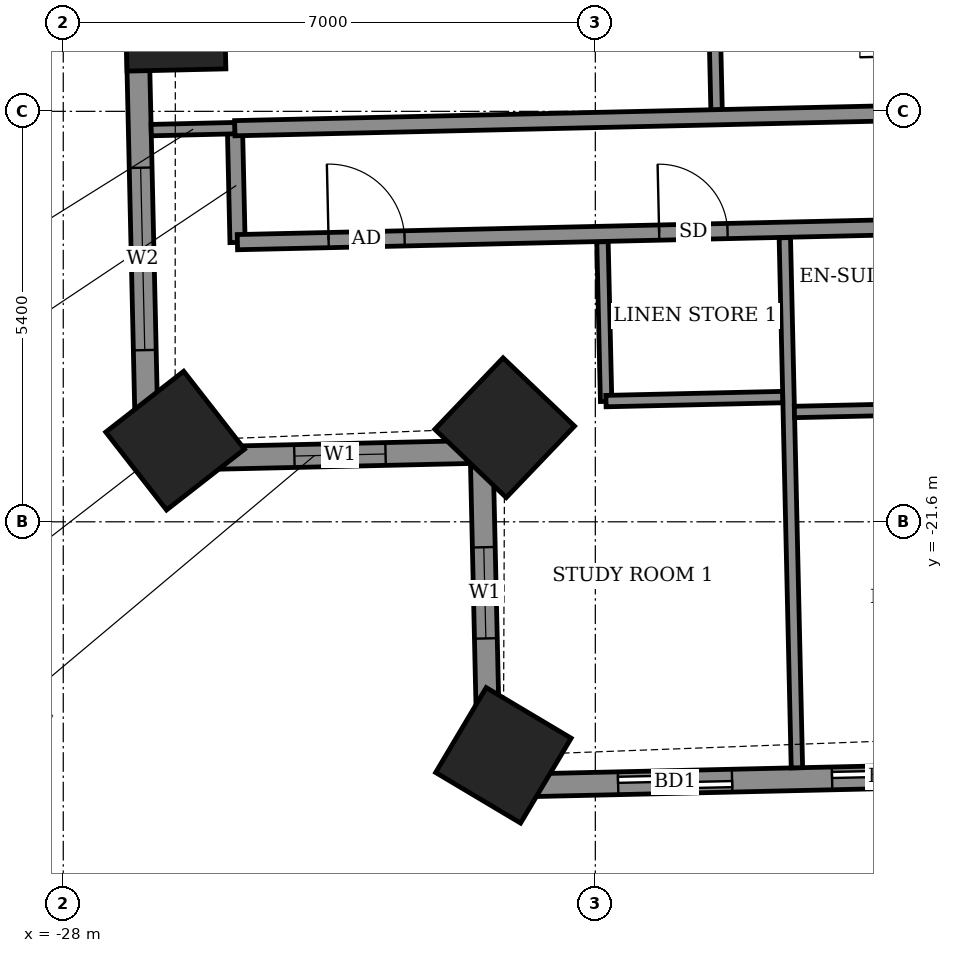
"""IFC4 building model, lengths in metres.
Left out: names, types, materials, properties, quantities, classifications, styles, units other than length and angle.
Written with IfcOpenShell. Run it as: python <this file> out.ifc"""

import sys

from ifc_helpers import new_model, si_unit, direction, frame, frame_2d, origin, origin_2d, place, context, subcontext, project, spatial, rectangle, extrude, element, fill, save


model = new_model("IFC4")
c1 = context("Model", 3, precision=1e-05, world=origin(), true_north=direction((0.0, 1.0)))
c2 = subcontext(c1, "Body", "Model", "MODEL_VIEW")
j1 = project(units=[si_unit("LENGTHUNIT", "METRE"), si_unit("PLANEANGLEUNIT", "RADIAN")], contexts=[c1])
p1 = place(None, origin())
s1 = spatial("IfcSite", under=j1, at=p1, CompositionType="ELEMENT")
p2 = place(p1, origin())
s2 = spatial("IfcBuilding", under=s1, at=p2, CompositionType="ELEMENT")
p3 = place(p2, frame((0.0, 0.0, 130.1)))
s3 = spatial("IfcBuildingStorey", under=s2, at=p3, CompositionType="ELEMENT", Elevation=130.1)
for number, where, z_axis, x_axis in (
    (1, (-26.525, -15.006, -0.55), (0.0, 0.0, 1.0), (0.023, -1.0, 0.0)),
    (2, (-26.529, -20.532, -0.55), (0.0, 0.0, 1.0), (0.615, -0.788, 0.0)),
    (3, (-22.193, -20.362, -0.55), (0.0, 0.0, 1.0), (0.723, -0.691, 0.0)),
    (4, (-22.209, -24.672, -0.55), (0.0, 0.0, 1.0), (0.859, -0.512, 0.0)),
):
    element("IfcColumn", number, at=place(p3, frame(where, z_axis=z_axis, x_axis=x_axis)), inside=s3, PredefinedType="COLUMN", context=c2, shape_type="SweptSolid", body=[
        extrude(rectangle(XDim=1.3, YDim=1.3, at=origin_2d()), origin(), (0.0, 0.0, 1.0), 3.6),
    ])
p4 = place(p3, frame((-27.161, -9.052, 0.0), z_axis=(0.0, 0.0, 1.0), x_axis=(0.022665616813, -0.999743101909, 0.0)))
e5 = element("IfcWall", 5, at=p4, inside=s3, PredefinedType="SOLIDWALL", context=c2, shape_type="SweptSolid", body=[
    extrude(rectangle(XDim=11.73, YDim=0.3, at=frame_2d((5.865, 0.0))), origin(), (0.0, 0.0, 1.0), 3.05),
])
p5 = place(p4, frame((1.029, 0.0, 0.0)))
e6 = element("IfcOpeningElement", 6, at=p5, cuts=e5, PredefinedType="OPENING", context=c2, shape_type="SweptSolid", body=[
    extrude(rectangle(XDim=1.5, YDim=2.4, at=frame_2d((0.75, 1.2))), frame((0.0, 0.16, 0.0), z_axis=(0.0, -1.0, 0.0), x_axis=(1.0, 0.0, 0.0)), (0.0, 0.0, 1.0), 0.32),
])
p6 = place(p4, frame((3.71, 0.0, 0.9)))
e7 = element("IfcOpeningElement", 7, at=p6, cuts=e5, PredefinedType="OPENING", context=c2, shape_type="SweptSolid", body=[
    extrude(rectangle(XDim=1.2, YDim=1.5, at=frame_2d((0.6, 0.75))), frame((0.0, 0.16, 0.0), z_axis=(0.0, -1.0, 0.0), x_axis=(1.0, 0.0, 0.0)), (0.0, 0.0, 1.0), 0.32),
])
p7 = place(p4, frame((7.892, 0.0, 0.9)))
e8 = element("IfcOpeningElement", 8, at=p7, cuts=e5, PredefinedType="OPENING", context=c2, shape_type="SweptSolid", body=[
    extrude(rectangle(XDim=2.4, YDim=1.5, at=frame_2d((1.2, 0.75))), frame((0.0, 0.16, 0.0), z_axis=(0.0, -1.0, 0.0), x_axis=(1.0, 0.0, 0.0)), (0.0, 0.0, 1.0), 0.32),
])
p8 = place(p3, frame((-26.895, -20.779, 0.0), z_axis=(0.0, 0.0, 1.0), x_axis=(0.999741204967, 0.022749133868, 0.0)))
e9 = element("IfcWall", 9, at=p8, inside=s3, PredefinedType="SOLIDWALL", context=c2, shape_type="SweptSolid", body=[
    extrude(rectangle(XDim=4.4, YDim=0.3, at=frame_2d((2.2, 0.0))), origin(), (0.0, 0.0, 1.0), 2.55),
])
p9 = place(p8, frame((1.936, 0.0, 0.9)))
e10 = element("IfcOpeningElement", 10, at=p9, cuts=e9, PredefinedType="OPENING", context=c2, shape_type="SweptSolid", body=[
    extrude(rectangle(XDim=1.2, YDim=1.5, at=frame_2d((0.6, 0.75))), frame((0.0, 0.16, 0.0), z_axis=(0.0, -1.0, 0.0), x_axis=(1.0, 0.0, 0.0)), (0.0, 0.0, 1.0), 0.32),
])
p10 = place(p3, frame((-22.496, -20.679, 0.0), z_axis=(0.0, 0.0, 1.0), x_axis=(0.022749133868, -0.999741204967, 0.0)))
e11 = element("IfcWall", 11, at=p10, inside=s3, PredefinedType="SOLIDWALL", context=c2, shape_type="SweptSolid", body=[
    extrude(rectangle(XDim=4.4, YDim=0.3, at=frame_2d((2.2, 0.0))), origin(), (0.0, 0.0, 1.0), 2.55),
])
p11 = place(p10, frame((1.256, 0.0, 0.9)))
e12 = element("IfcOpeningElement", 12, at=p11, cuts=e11, PredefinedType="OPENING", context=c2, shape_type="SweptSolid", body=[
    extrude(rectangle(XDim=1.2, YDim=1.5, at=frame_2d((0.6, 0.75))), frame((0.0, 0.16, 0.0), z_axis=(0.0, -1.0, 0.0), x_axis=(1.0, 0.0, 0.0)), (0.0, 0.0, 1.0), 0.32),
])
p12 = place(p3, frame((-22.396, -25.078, 0.0), z_axis=(0.0, 0.0, 1.0), x_axis=(0.99974279854, 0.022678993965, 0.0)))
e13 = element("IfcWall", 13, at=p12, inside=s3, PredefinedType="SOLIDWALL", context=c2, shape_type="SweptSolid", body=[
    extrude(rectangle(XDim=41.844, YDim=0.3, at=frame_2d((20.922, 0.0))), origin(), (0.0, 0.0, 1.0), 3.05),
])
p13 = place(p12, frame((1.696, 0.0, 0.0)))
e14 = element("IfcOpeningElement", 14, at=p13, cuts=e13, PredefinedType="OPENING", context=c2, shape_type="SweptSolid", body=[
    extrude(rectangle(XDim=1.5, YDim=2.4, at=frame_2d((0.75, 1.2))), frame((0.0, 0.16, 0.0), z_axis=(0.0, -1.0, 0.0), x_axis=(1.0, 0.0, 0.0)), (0.0, 0.0, 1.0), 0.32),
])
p14 = place(p12, frame((4.512, 0.0, 0.0)))
e15 = element("IfcOpeningElement", 15, at=p14, cuts=e13, PredefinedType="OPENING", context=c2, shape_type="SweptSolid", body=[
    extrude(rectangle(XDim=1.5, YDim=2.4, at=frame_2d((0.75, 1.2))), frame((0.0, 0.16, 0.0), z_axis=(0.0, -1.0, 0.0), x_axis=(1.0, 0.0, 0.0)), (0.0, 0.0, 1.0), 0.32),
])
p15 = place(p12, frame((9.625, 0.0, 0.0)))
e16 = element("IfcOpeningElement", 16, at=p15, cuts=e13, PredefinedType="OPENING", context=c2, shape_type="SweptSolid", body=[
    extrude(rectangle(XDim=1.5, YDim=2.4, at=frame_2d((0.75, 1.2))), frame((0.0, 0.16, 0.0), z_axis=(0.0, -1.0, 0.0), x_axis=(1.0, 0.0, 0.0)), (0.0, 0.0, 1.0), 0.32),
])
p16 = place(p12, frame((14.749, 0.0, 0.0)))
e17 = element("IfcOpeningElement", 17, at=p16, cuts=e13, PredefinedType="OPENING", context=c2, shape_type="SweptSolid", body=[
    extrude(rectangle(XDim=1.5, YDim=2.4, at=frame_2d((0.75, 1.2))), frame((0.0, 0.16, 0.0), z_axis=(0.0, -1.0, 0.0), x_axis=(1.0, 0.0, 0.0)), (0.0, 0.0, 1.0), 0.32),
])
p17 = place(p12, frame((17.861, 0.0, 0.0)))
e18 = element("IfcOpeningElement", 18, at=p17, cuts=e13, PredefinedType="OPENING", context=c2, shape_type="SweptSolid", body=[
    extrude(rectangle(XDim=1.5, YDim=2.4, at=frame_2d((0.75, 1.2))), frame((0.0, 0.16, 0.0), z_axis=(0.0, -1.0, 0.0), x_axis=(1.0, 0.0, 0.0)), (0.0, 0.0, 1.0), 0.32),
])
p18 = place(p12, frame((22.486, 0.0, 0.0)))
e19 = element("IfcOpeningElement", 19, at=p18, cuts=e13, PredefinedType="OPENING", context=c2, shape_type="SweptSolid", body=[
    extrude(rectangle(XDim=1.5, YDim=2.4, at=frame_2d((0.75, 1.2))), frame((0.0, 0.16, 0.0), z_axis=(0.0, -1.0, 0.0), x_axis=(1.0, 0.0, 0.0)), (0.0, 0.0, 1.0), 0.32),
])
p19 = place(p12, frame((25.598, 0.0, 0.0)))
e20 = element("IfcOpeningElement", 20, at=p19, cuts=e13, PredefinedType="OPENING", context=c2, shape_type="SweptSolid", body=[
    extrude(rectangle(XDim=1.5, YDim=2.4, at=frame_2d((0.75, 1.2))), frame((0.0, 0.16, 0.0), z_axis=(0.0, -1.0, 0.0), x_axis=(1.0, 0.0, 0.0)), (0.0, 0.0, 1.0), 0.32),
])
p20 = place(p12, frame((30.7, 0.0, 0.0)))
e21 = element("IfcOpeningElement", 21, at=p20, cuts=e13, PredefinedType="OPENING", context=c2, shape_type="SweptSolid", body=[
    extrude(rectangle(XDim=1.5, YDim=2.4, at=frame_2d((0.75, 1.2))), frame((0.0, 0.16, 0.0), z_axis=(0.0, -1.0, 0.0), x_axis=(1.0, 0.0, 0.0)), (0.0, 0.0, 1.0), 0.32),
])
p21 = place(p12, frame((35.81, 0.0, 0.0)))
e22 = element("IfcOpeningElement", 22, at=p21, cuts=e13, PredefinedType="OPENING", context=c2, shape_type="SweptSolid", body=[
    extrude(rectangle(XDim=1.5, YDim=2.4, at=frame_2d((0.75, 1.2))), frame((0.0, 0.16, 0.0), z_axis=(0.0, -1.0, 0.0), x_axis=(1.0, 0.0, 0.0)), (0.0, 0.0, 1.0), 0.32),
])
p22 = place(p12, frame((38.124, 0.0, 0.9)))
e23 = element("IfcOpeningElement", 23, at=p22, cuts=e13, PredefinedType="OPENING", context=c2, shape_type="SweptSolid", body=[
    extrude(rectangle(XDim=2.4, YDim=1.5, at=frame_2d((1.2, 0.75))), frame((0.0, 0.16, 0.0), z_axis=(0.0, -1.0, 0.0), x_axis=(1.0, 0.0, 0.0)), (0.0, 0.0, 1.0), 0.32),
])
p23 = place(p3, frame((-18.348, -24.836, 0.0), z_axis=(0.0, 0.0, 1.0), x_axis=(-0.02281919218, 0.999739608332, 0.0)))
e24 = element("IfcWall", 24, at=p23, inside=s3, PredefinedType="PARTITIONING", context=c2, shape_type="SweptSolid", body=[
    extrude(rectangle(XDim=6.976, YDim=0.15, at=frame_2d((3.488, 0.0))), origin(), (0.0, 0.0, 1.0), 2.55),
])
p24 = place(p3, frame((-18.381, -20.155, 0.0), z_axis=(0.0, 0.0, 1.0), x_axis=(0.999749797124, 0.022368351553, 0.0)))
e25 = element("IfcWall", 25, at=p24, inside=s3, PredefinedType="PARTITIONING", context=c2, shape_type="SweptSolid", body=[
    extrude(rectangle(XDim=2.325, YDim=0.15, at=frame_2d((1.162, 0.0))), origin(), (0.0, 0.0, 1.0), 3.05),
])
p25 = place(p3, frame((-20.858, -20.016, 0.0), z_axis=(0.0, 0.0, 1.0), x_axis=(-0.022895647347, 0.999737860308, 0.0)))
e26 = element("IfcWall", 26, at=p25, inside=s3, PredefinedType="PARTITIONING", context=c2, shape_type="SweptSolid", body=[
    extrude(rectangle(XDim=2.101, YDim=0.15, at=frame_2d((1.05, 0.0))), origin(), (0.0, 0.0, 1.0), 3.05),
])
p26 = place(p3, frame((-20.86, -20.012, 0.0), z_axis=(0.0, 0.0, 1.0), x_axis=(0.99974031529, 0.022788198363, 0.0)))
e27 = element("IfcWall", 27, at=p26, inside=s3, PredefinedType="PARTITIONING", context=c2, shape_type="SweptSolid", body=[
    extrude(rectangle(XDim=2.325, YDim=0.15, at=frame_2d((1.162, 0.0))), origin(), (0.0, 0.0, 1.0), 3.05),
])
p27 = place(p3, frame((-25.707, -17.925, 0.0), z_axis=(0.0, 0.0, 1.0), x_axis=(-0.022617910375, 0.999744182344, 0.0)))
e28 = element("IfcWall", 28, at=p27, inside=s3, PredefinedType="PARTITIONING", context=c2, shape_type="SweptSolid", body=[
    extrude(rectangle(XDim=1.5, YDim=0.2, at=frame_2d((0.75, 0.0))), origin(), (0.0, 0.0, 1.0), 3.05),
])
p28 = place(p3, frame((-25.709, -17.921, 0.0), z_axis=(0.0, 0.0, 1.0), x_axis=(0.999742764922, 0.022680475901, 0.0)))
e29 = element("IfcWall", 29, at=p28, inside=s3, PredefinedType="PARTITIONING", context=c2, shape_type="SweptSolid", body=[
    extrude(rectangle(XDim=10.84, YDim=0.2, at=frame_2d((5.42, 0.0))), origin(), (0.0, 0.0, 1.0), 3.05),
])
p29 = place(p28, frame((1.2, 0.0, 0.0)))
e30 = element("IfcOpeningElement", 30, at=p29, cuts=e29, PredefinedType="OPENING", context=c2, shape_type="SweptSolid", body=[
    extrude(rectangle(XDim=1.0, YDim=2.1, at=frame_2d((0.5, 1.05))), frame((0.0, 0.11, 0.0), z_axis=(0.0, -1.0, 0.0), x_axis=(1.0, 0.0, 0.0)), (0.0, 0.0, 1.0), 0.22),
])
p30 = place(p28, frame((5.55, 0.0, 0.0)))
e31 = element("IfcOpeningElement", 31, at=p30, cuts=e29, PredefinedType="OPENING", context=c2, shape_type="SweptSolid", body=[
    extrude(rectangle(XDim=0.9, YDim=2.1, at=frame_2d((0.45, 1.05))), frame((0.0, 0.11, 0.0), z_axis=(0.0, -1.0, 0.0), x_axis=(1.0, 0.0, 0.0)), (0.0, 0.0, 1.0), 0.22),
])
p31 = place(p28, frame((9.84, 0.0, 0.0)))
e32 = element("IfcOpeningElement", 32, at=p31, cuts=e29, PredefinedType="OPENING", context=c2, shape_type="SweptSolid", body=[
    extrude(rectangle(XDim=0.9, YDim=2.1, at=frame_2d((0.45, 1.05))), frame((0.0, 0.11, 0.0), z_axis=(0.0, -1.0, 0.0), x_axis=(1.0, 0.0, 0.0)), (0.0, 0.0, 1.0), 0.22),
])
p32 = place(p3, frame((-19.405, -16.182, 0.0), z_axis=(0.0, 0.0, 1.0), x_axis=(-0.022605686808, 0.999744458811, 0.0)))
e33 = element("IfcWall", 33, at=p32, inside=s3, PredefinedType="PARTITIONING", context=c2, shape_type="SweptSolid", body=[
    extrude(rectangle(XDim=2.3, YDim=0.15, at=frame_2d((1.15, 0.0))), origin(), (0.0, 0.0, 1.0), 3.05),
])
p33 = place(p3, frame((-16.603, -16.218, 0.0), z_axis=(0.0, 0.0, 1.0), x_axis=(-0.022698146637, 0.999742363881, 0.0)))
e34 = element("IfcWall", 34, at=p33, inside=s3, PredefinedType="PARTITIONING", context=c2, shape_type="SweptSolid", body=[
    extrude(rectangle(XDim=28.374, YDim=0.2, at=frame_2d((14.187, 0.0))), origin(), (0.0, 0.0, 1.0), 3.05),
])
p34 = place(p33, frame((24.537, 0.0, 0.0)))
e35 = element("IfcOpeningElement", 35, at=p34, cuts=e34, PredefinedType="OPENING", context=c2, shape_type="SweptSolid", body=[
    extrude(rectangle(XDim=1.0, YDim=2.1, at=frame_2d((0.5, 1.05))), frame((0.0, 0.11, 0.0), z_axis=(0.0, -1.0, 0.0), x_axis=(1.0, 0.0, 0.0)), (0.0, 0.0, 1.0), 0.22),
])
p35 = place(p33, frame((26.724, 0.0, 0.0)))
e36 = element("IfcOpeningElement", 36, at=p35, cuts=e34, PredefinedType="OPENING", context=c2, shape_type="SweptSolid", body=[
    extrude(rectangle(XDim=0.9, YDim=2.1, at=frame_2d((0.45, 1.05))), frame((0.0, 0.11, 0.0), z_axis=(0.0, -1.0, 0.0), x_axis=(1.0, 0.0, 0.0)), (0.0, 0.0, 1.0), 0.22),
])
p36 = place(p33, frame((22.099, 0.0, 0.0)))
e37 = element("IfcOpeningElement", 37, at=p36, cuts=e34, PredefinedType="OPENING", context=c2, shape_type="SweptSolid", body=[
    extrude(rectangle(XDim=1.0, YDim=2.1, at=frame_2d((0.5, 1.05))), frame((0.0, 0.11, 0.0), z_axis=(0.0, -1.0, 0.0), x_axis=(1.0, 0.0, 0.0)), (0.0, 0.0, 1.0), 0.22),
])
p37 = place(p33, frame((16.324, 0.0, 0.0)))
e38 = element("IfcOpeningElement", 38, at=p37, cuts=e34, PredefinedType="OPENING", context=c2, shape_type="SweptSolid", body=[
    extrude(rectangle(XDim=1.0, YDim=2.1, at=frame_2d((0.5, 1.05))), frame((0.0, 0.11, 0.0), z_axis=(0.0, -1.0, 0.0), x_axis=(1.0, 0.0, 0.0)), (0.0, 0.0, 1.0), 0.22),
])
p38 = place(p33, frame((19.449, 0.0, 0.0)))
e39 = element("IfcOpeningElement", 39, at=p38, cuts=e34, PredefinedType="OPENING", context=c2, shape_type="SweptSolid", body=[
    extrude(rectangle(XDim=0.9, YDim=2.1, at=frame_2d((0.45, 1.05))), frame((0.0, 0.11, 0.0), z_axis=(0.0, -1.0, 0.0), x_axis=(1.0, 0.0, 0.0)), (0.0, 0.0, 1.0), 0.22),
])
p39 = place(p33, frame((13.574, 0.0, 0.0)))
e40 = element("IfcOpeningElement", 40, at=p39, cuts=e34, PredefinedType="OPENING", context=c2, shape_type="SweptSolid", body=[
    extrude(rectangle(XDim=1.0, YDim=2.1, at=frame_2d((0.5, 1.05))), frame((0.0, 0.11, 0.0), z_axis=(0.0, -1.0, 0.0), x_axis=(1.0, 0.0, 0.0)), (0.0, 0.0, 1.0), 0.22),
])
p40 = place(p33, frame((11.449, 0.0, 0.0)))
e41 = element("IfcOpeningElement", 41, at=p40, cuts=e34, PredefinedType="OPENING", context=c2, shape_type="SweptSolid", body=[
    extrude(rectangle(XDim=0.9, YDim=2.1, at=frame_2d((0.45, 1.05))), frame((0.0, 0.11, 0.0), z_axis=(0.0, -1.0, 0.0), x_axis=(1.0, 0.0, 0.0)), (0.0, 0.0, 1.0), 0.22),
])
p41 = place(p33, frame((8.524, 0.0, 0.0)))
e42 = element("IfcOpeningElement", 42, at=p41, cuts=e34, PredefinedType="OPENING", context=c2, shape_type="SweptSolid", body=[
    extrude(rectangle(XDim=1.0, YDim=2.1, at=frame_2d((0.5, 1.05))), frame((0.0, 0.11, 0.0), z_axis=(0.0, -1.0, 0.0), x_axis=(1.0, 0.0, 0.0)), (0.0, 0.0, 1.0), 0.22),
])
p42 = place(p33, frame((5.325, 0.0, 0.0)))
e43 = element("IfcOpeningElement", 43, at=p42, cuts=e34, PredefinedType="OPENING", context=c2, shape_type="SweptSolid", body=[
    extrude(rectangle(XDim=1.0, YDim=2.1, at=frame_2d((0.5, 1.05))), frame((0.0, 0.11, 0.0), z_axis=(0.0, -1.0, 0.0), x_axis=(1.0, 0.0, 0.0)), (0.0, 0.0, 1.0), 0.22),
])
p43 = place(p33, frame((2.85, 0.0, 0.0)))
e44 = element("IfcOpeningElement", 44, at=p43, cuts=e34, PredefinedType="OPENING", context=c2, shape_type="SweptSolid", body=[
    extrude(rectangle(XDim=1.0, YDim=2.1, at=frame_2d((0.5, 1.05))), frame((0.0, 0.11, 0.0), z_axis=(0.0, -1.0, 0.0), x_axis=(1.0, 0.0, 0.0)), (0.0, 0.0, 1.0), 0.22),
])
p44 = place(p33, frame((0.75, 0.0, 0.0)))
e45 = element("IfcOpeningElement", 45, at=p44, cuts=e34, PredefinedType="OPENING", context=c2, shape_type="SweptSolid", body=[
    extrude(rectangle(XDim=0.9, YDim=2.1, at=frame_2d((0.45, 1.05))), frame((0.0, 0.11, 0.0), z_axis=(0.0, -1.0, 0.0), x_axis=(1.0, 0.0, 0.0)), (0.0, 0.0, 1.0), 0.22),
])
p45 = place(p3, frame((-26.843, -16.447, 0.0), z_axis=(0.0, 0.0, 1.0), x_axis=(0.999720170098, 0.023655475055, 0.0)))
e46 = element("IfcWall", 46, at=p45, inside=s3, PredefinedType="PARTITIONING", context=c2, shape_type="SweptSolid", body=[
    extrude(rectangle(XDim=1.104, YDim=0.15, at=frame_2d((0.552, 0.0))), origin(), (0.0, 0.0, 1.0), 2.55),
])
p46 = place(p3, frame((-25.743, -16.422, 0.0), z_axis=(0.0, 0.0, 1.0), x_axis=(0.999741076645, 0.022754772455, 0.0)))
e47 = element("IfcWall", 47, at=p46, inside=s3, PredefinedType="PARTITIONING", context=c2, shape_type="SweptSolid", body=[
    extrude(rectangle(XDim=9.141, YDim=0.2, at=frame_2d((4.571, 0.0))), origin(), (0.0, 0.0, 1.0), 3.05),
])
p47 = place(p7, origin())
e48 = element("IfcWindow", 48, at=p47, inside=s3, PartitioningType="DOUBLE_PANEL_VERTICAL", PredefinedType="WINDOW", context=c2, shape_type="SweptSolid", body=[
    extrude(rectangle(XDim=2.4, YDim=1.5, at=frame_2d((1.2, 0.75))), frame((0.0, 0.03, 0.0), z_axis=(0.0, -1.0, 0.0), x_axis=(1.0, 0.0, 0.0)), (0.0, 0.0, 1.0), 0.06),
])
fill(e8, e48)
p48 = place(p9, origin())
e49 = element("IfcWindow", 49, at=p48, inside=s3, PartitioningType="SINGLE_PANEL", PredefinedType="WINDOW", context=c2, shape_type="SweptSolid", body=[
    extrude(rectangle(XDim=1.2, YDim=1.5, at=frame_2d((0.6, 0.75))), frame((0.0, 0.03, 0.0), z_axis=(0.0, -1.0, 0.0), x_axis=(1.0, 0.0, 0.0)), (0.0, 0.0, 1.0), 0.06),
])
fill(e10, e49)
p49 = place(p11, origin())
e50 = element("IfcWindow", 50, at=p49, inside=s3, PartitioningType="SINGLE_PANEL", PredefinedType="WINDOW", context=c2, shape_type="SweptSolid", body=[
    extrude(rectangle(XDim=1.2, YDim=1.5, at=frame_2d((0.6, 0.75))), frame((0.0, 0.03, 0.0), z_axis=(0.0, -1.0, 0.0), x_axis=(1.0, 0.0, 0.0)), (0.0, 0.0, 1.0), 0.06),
])
fill(e12, e50)
p50 = place(p13, origin())
e51 = element("IfcDoor", 51, at=p50, inside=s3, OperationType="SLIDING_TO_LEFT", PredefinedType="DOOR", context=c2, shape_type="SweptSolid", body=[
    extrude(rectangle(XDim=1.5, YDim=2.4, at=frame_2d((0.75, 1.2))), frame((0.0, 0.025, 0.0), z_axis=(0.0, -1.0, 0.0), x_axis=(1.0, 0.0, 0.0)), (0.0, 0.0, 1.0), 0.05),
])
fill(e14, e51)
p51 = place(p14, origin())
e52 = element("IfcDoor", 52, at=p51, inside=s3, OperationType="SLIDING_TO_LEFT", PredefinedType="DOOR", context=c2, shape_type="SweptSolid", body=[
    extrude(rectangle(XDim=1.5, YDim=2.4, at=frame_2d((0.75, 1.2))), frame((0.0, 0.025, 0.0), z_axis=(0.0, -1.0, 0.0), x_axis=(1.0, 0.0, 0.0)), (0.0, 0.0, 1.0), 0.05),
])
fill(e15, e52)
p52 = place(p29, origin())
e53 = element("IfcDoor", 53, at=p52, inside=s3, OperationType="SINGLE_SWING_LEFT", PredefinedType="DOOR", context=c2, shape_type="SweptSolid", body=[
    extrude(rectangle(XDim=1.0, YDim=2.1, at=frame_2d((0.5, 1.05))), frame((0.0, 0.025, 0.0), z_axis=(0.0, -1.0, 0.0), x_axis=(1.0, 0.0, 0.0)), (0.0, 0.0, 1.0), 0.05),
])
fill(e30, e53)
p53 = place(p30, origin())
e54 = element("IfcDoor", 54, at=p53, inside=s3, OperationType="SINGLE_SWING_LEFT", PredefinedType="DOOR", context=c2, shape_type="SweptSolid", body=[
    extrude(rectangle(XDim=0.9, YDim=2.1, at=frame_2d((0.45, 1.05))), frame((0.0, 0.025, 0.0), z_axis=(0.0, -1.0, 0.0), x_axis=(1.0, 0.0, 0.0)), (0.0, 0.0, 1.0), 0.05),
])
fill(e31, e54)
save(model, sys.argv[1])
